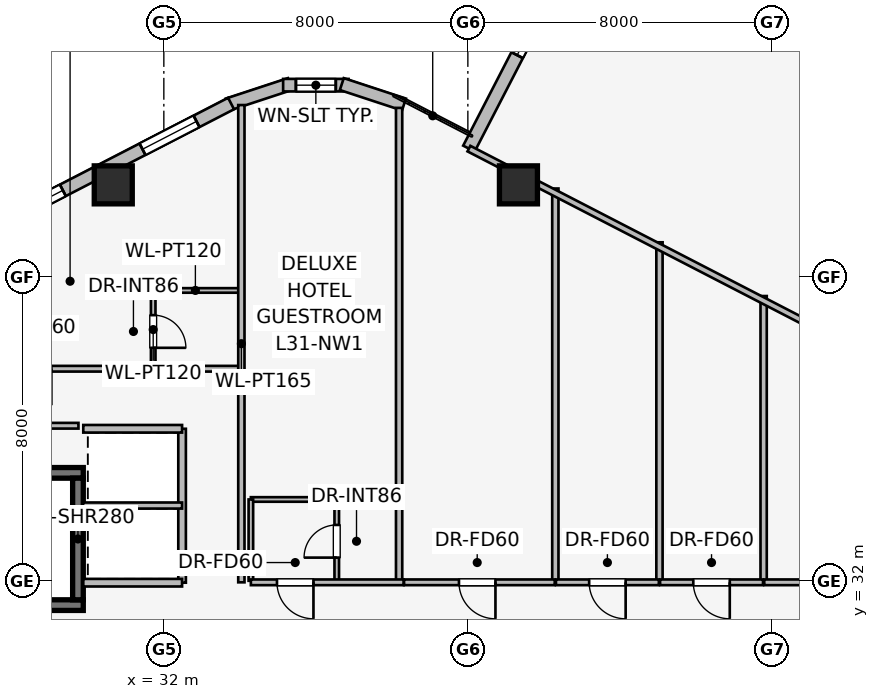
"""IFC4 building model, lengths in metres.
Left out: names, types, materials, properties, quantities, classifications, styles, units other than length and angle.
Written with IfcOpenShell. Run it as: python <this file> out.ifc"""

import sys

from ifc_helpers import new_model, si_unit, direction, frame, frame_2d, origin, origin_2d, place, context, subcontext, project, spatial, rectangle, extrude, element, fill, save


model = new_model("IFC4")
c1 = context("Model", 3, precision=1e-05, world=origin(), true_north=direction((0.0, 1.0)))
c2 = subcontext(c1, "Body", "Model", "MODEL_VIEW")
j1 = project(units=[si_unit("LENGTHUNIT", "METRE"), si_unit("PLANEANGLEUNIT", "RADIAN")], contexts=[c1])
p1 = place(None, origin())
s1 = spatial("IfcSite", under=j1, at=p1, CompositionType="ELEMENT")
p2 = place(p1, origin())
s2 = spatial("IfcBuilding", under=s1, at=p2, CompositionType="ELEMENT")
p3 = place(p2, frame((0.0, 0.0, 118.8)))
s3 = spatial("IfcBuildingStorey", under=s2, at=p3, CompositionType="ELEMENT", Elevation=118.8)
p4 = place(p3, frame((21.52, 31.36, 0.0), z_axis=(0.0, 0.0, 1.0), x_axis=(1.0, 0.0, 0.0)))
e1 = element("IfcWall", 1, at=p4, inside=s3, PredefinedType="SHEAR", context=c2, shape_type="SweptSolid", body=[
    extrude(rectangle(XDim=8.36, YDim=0.28, at=frame_2d((4.18, 0.0))), origin(), (0.0, 0.0, 1.0), 3.45),
])
p5 = place(p4, frame((0.45, 0.0, 0.0)))
e2 = element("IfcOpeningElement", 2, at=p5, cuts=e1, PredefinedType="OPENING", context=c2, shape_type="SweptSolid", body=[
    extrude(rectangle(XDim=1.05, YDim=2.0, at=frame_2d((0.525, 1.0))), frame((0.0, 0.15, 0.0), z_axis=(0.0, -1.0, 0.0), x_axis=(1.0, 0.0, 0.0)), (0.0, 0.0, 1.0), 0.3),
])
p6 = place(p3, frame((29.88, 34.84, 0.0), z_axis=(0.0, 0.0, 1.0), x_axis=(-1.0, 0.0, 0.0)))
e3 = element("IfcWall", 3, at=p6, inside=s3, PredefinedType="SHEAR", context=c2, shape_type="SweptSolid", body=[
    extrude(rectangle(XDim=8.36, YDim=0.28, at=frame_2d((4.18, 0.0))), origin(), (0.0, 0.0, 1.0), 3.45),
])
p7 = place(p3, frame((29.74, 31.5, 0.0), z_axis=(0.0, 0.0, 1.0), x_axis=(0.0, 1.0, 0.0)))
e4 = element("IfcWall", 4, at=p7, inside=s3, PredefinedType="SHEAR", context=c2, shape_type="SweptSolid", body=[
    extrude(rectangle(XDim=3.2, YDim=0.28, at=frame_2d((1.6, 0.0))), origin(), (0.0, 0.0, 1.0), 3.45),
])
for number, where, z_axis, x_axis in (
    (5, (41.331, 42.418, 0.0), (0.0, 0.0, 1.0), (1.0, 0.0, 0.0)),
    (6, (30.669, 42.418, 0.0), (0.0, 0.0, 1.0), (1.0, 0.0, 0.0)),
):
    element("IfcColumn", number, at=place(p3, frame(where, z_axis=z_axis, x_axis=x_axis)), inside=s3, PredefinedType="COLUMN", context=c2, shape_type="SweptSolid", body=[
        extrude(rectangle(XDim=1.0, YDim=1.0, at=origin_2d()), origin(), (0.0, 0.0, 1.0), 3.45),
    ])
p8 = place(p3, frame((40.028, 43.372, 0.0), z_axis=(0.0, 0.0, 1.0), x_axis=(0.45865166523, 0.888616143215, 0.0)))
e7 = element("IfcWall", 7, at=p8, inside=s3, PredefinedType="STANDARD", context=c2, shape_type="SweptSolid", body=[
    extrude(rectangle(XDim=19.199, YDim=0.34, at=frame_2d((9.6, 0.0))), origin(), (0.0, 0.0, 1.0), 3.19),
])
p9 = place(p8, frame((2.767, 0.0, 0.75)))
e8 = element("IfcOpeningElement", 8, at=p9, cuts=e7, PredefinedType="OPENING", context=c2, shape_type="SweptSolid", body=[
    extrude(rectangle(XDim=1.6, YDim=1.55, at=frame_2d((0.8, 0.775))), frame((0.0, 0.18, 0.0), z_axis=(0.0, -1.0, 0.0), x_axis=(1.0, 0.0, 0.0)), (0.0, 0.0, 1.0), 0.36),
])
p10 = place(p8, frame((8.8, 0.0, 0.75)))
e9 = element("IfcOpeningElement", 9, at=p10, cuts=e7, PredefinedType="OPENING", context=c2, shape_type="SweptSolid", body=[
    extrude(rectangle(XDim=1.6, YDim=1.55, at=frame_2d((0.8, 0.775))), frame((0.0, 0.18, 0.0), z_axis=(0.0, -1.0, 0.0), x_axis=(1.0, 0.0, 0.0)), (0.0, 0.0, 1.0), 0.36),
])
p11 = place(p8, frame((14.833, 0.0, 0.75)))
e10 = element("IfcOpeningElement", 10, at=p11, cuts=e7, PredefinedType="OPENING", context=c2, shape_type="SweptSolid", body=[
    extrude(rectangle(XDim=1.6, YDim=1.55, at=frame_2d((0.8, 0.775))), frame((0.0, 0.18, 0.0), z_axis=(0.0, -1.0, 0.0), x_axis=(1.0, 0.0, 0.0)), (0.0, 0.0, 1.0), 0.36),
])
p12 = place(p3, frame((33.681, 44.532, 0.0), z_axis=(0.0, 0.0, 1.0), x_axis=(0.949937416267, 0.312440242569, 0.0)))
e11 = element("IfcWall", 11, at=p12, inside=s3, PredefinedType="STANDARD", context=c2, shape_type="SweptSolid", body=[
    extrude(rectangle(XDim=1.722, YDim=0.33, at=frame_2d((0.861, 0.0))), origin(), (0.0, 0.0, 1.0), 3.19),
])
p13 = place(p3, frame((35.139, 45.041, 0.0), z_axis=(0.0, 0.0, 1.0), x_axis=(1.0, 0.0, 0.0)))
e12 = element("IfcWall", 12, at=p13, inside=s3, PredefinedType="STANDARD", context=c2, shape_type="SweptSolid", body=[
    extrude(rectangle(XDim=1.722, YDim=0.33, at=frame_2d((0.861, 0.0))), origin(), (0.0, 0.0, 1.0), 3.19),
])
p14 = place(p13, frame((0.336, 0.0, 0.75)))
e13 = element("IfcOpeningElement", 13, at=p14, cuts=e12, PredefinedType="OPENING", context=c2, shape_type="SweptSolid", body=[
    extrude(rectangle(XDim=1.05, YDim=1.4, at=frame_2d((0.525, 0.7))), frame((0.0, 0.175, 0.0), z_axis=(0.0, -1.0, 0.0), x_axis=(1.0, 0.0, 0.0)), (0.0, 0.0, 1.0), 0.35),
])
p15 = place(p3, frame((36.683, 45.07, 0.0), z_axis=(0.0, 0.0, 1.0), x_axis=(0.949937416267, -0.312440242569, 0.0)))
e14 = element("IfcWall", 14, at=p15, inside=s3, PredefinedType="STANDARD", context=c2, shape_type="SweptSolid", body=[
    extrude(rectangle(XDim=1.722, YDim=0.33, at=frame_2d((0.861, 0.0))), origin(), (0.0, 0.0, 1.0), 3.19),
])
p16 = place(p3, frame((17.169, 35.99, 0.0), z_axis=(0.0, 0.0, 1.0), x_axis=(0.888613612362, 0.458656568606, 0.0)))
e15 = element("IfcWall", 15, at=p16, inside=s3, PredefinedType="STANDARD", context=c2, shape_type="SweptSolid", body=[
    extrude(rectangle(XDim=18.681, YDim=0.34, at=frame_2d((9.34, 0.0))), origin(), (0.0, 0.0, 1.0), 3.19),
])
p17 = place(p16, frame((1.023, 0.0, 0.75)))
e16 = element("IfcOpeningElement", 16, at=p17, cuts=e15, PredefinedType="OPENING", context=c2, shape_type="SweptSolid", body=[
    extrude(rectangle(XDim=1.6, YDim=1.55, at=frame_2d((0.8, 0.775))), frame((0.0, 0.18, 0.0), z_axis=(0.0, -1.0, 0.0), x_axis=(1.0, 0.0, 0.0)), (0.0, 0.0, 1.0), 0.36),
])
p18 = place(p16, frame((4.981, 0.0, 0.75)))
e17 = element("IfcOpeningElement", 17, at=p18, cuts=e15, PredefinedType="OPENING", context=c2, shape_type="SweptSolid", body=[
    extrude(rectangle(XDim=2.1, YDim=1.5, at=frame_2d((1.05, 0.75))), frame((0.0, 0.18, 0.0), z_axis=(0.0, -1.0, 0.0), x_axis=(1.0, 0.0, 0.0)), (0.0, 0.0, 1.0), 0.36),
])
p19 = place(p16, frame((8.29, 0.0, 0.75)))
e18 = element("IfcOpeningElement", 18, at=p19, cuts=e15, PredefinedType="OPENING", context=c2, shape_type="SweptSolid", body=[
    extrude(rectangle(XDim=2.1, YDim=1.5, at=frame_2d((1.05, 0.75))), frame((0.0, 0.18, 0.0), z_axis=(0.0, -1.0, 0.0), x_axis=(1.0, 0.0, 0.0)), (0.0, 0.0, 1.0), 0.36),
])
p20 = place(p16, frame((11.6, 0.0, 0.75)))
e19 = element("IfcOpeningElement", 19, at=p20, cuts=e15, PredefinedType="OPENING", context=c2, shape_type="SweptSolid", body=[
    extrude(rectangle(XDim=2.1, YDim=1.5, at=frame_2d((1.05, 0.75))), frame((0.0, 0.18, 0.0), z_axis=(0.0, -1.0, 0.0), x_axis=(1.0, 0.0, 0.0)), (0.0, 0.0, 1.0), 0.36),
])
p21 = place(p16, frame((16.058, 0.0, 0.75)))
e20 = element("IfcOpeningElement", 20, at=p21, cuts=e15, PredefinedType="OPENING", context=c2, shape_type="SweptSolid", body=[
    extrude(rectangle(XDim=1.6, YDim=1.55, at=frame_2d((0.8, 0.775))), frame((0.0, 0.18, 0.0), z_axis=(0.0, -1.0, 0.0), x_axis=(1.0, 0.0, 0.0)), (0.0, 0.0, 1.0), 0.36),
])
p22 = place(p3, frame((32.48, 31.95, 0.0), z_axis=(0.0, 0.0, 1.0), x_axis=(0.0, 1.0, 0.0)))
e21 = element("IfcWall", 21, at=p22, inside=s3, PredefinedType="PARTITIONING", context=c2, shape_type="SweptSolid", body=[
    extrude(rectangle(XDim=4.05, YDim=0.2, at=frame_2d((2.025, 0.0))), origin(), (0.0, 0.0, 1.0), 3.19),
])
p23 = place(p3, frame((29.88, 36.0, 0.0), z_axis=(0.0, 0.0, 1.0), x_axis=(1.0, 0.0, 0.0)))
e22 = element("IfcWall", 22, at=p23, inside=s3, PredefinedType="PARTITIONING", context=c2, shape_type="SweptSolid", body=[
    extrude(rectangle(XDim=2.6, YDim=0.2, at=frame_2d((1.3, 0.0))), origin(), (0.0, 0.0, 1.0), 2.582),
])
p24 = place(p3, frame((32.48, 31.95, 0.0), z_axis=(0.0, 0.0, 1.0), x_axis=(-1.0, 0.0, 0.0)))
e23 = element("IfcWall", 23, at=p24, inside=s3, PredefinedType="PARTITIONING", context=c2, shape_type="SweptSolid", body=[
    extrude(rectangle(XDim=2.6, YDim=0.2, at=frame_2d((1.3, 0.0))), origin(), (0.0, 0.0, 1.0), 3.19),
])
p25 = place(p3, frame((29.875, 33.98, 0.0), z_axis=(0.0, 0.0, 1.0), x_axis=(1.0, 0.0, 0.0)))
e24 = element("IfcWall", 24, at=p25, inside=s3, PredefinedType="PARTITIONING", context=c2, shape_type="SweptSolid", body=[
    extrude(rectangle(XDim=2.605, YDim=0.16, at=frame_2d((1.302, 0.0))), origin(), (0.0, 0.0, 1.0), 3.19),
])
p26 = place(p3, frame((34.0, 39.64, 0.0), z_axis=(0.0, 0.0, 1.0), x_axis=(-1.0, 0.0, 0.0)))
e25 = element("IfcWall", 25, at=p26, inside=s3, PredefinedType="PARTITIONING", context=c2, shape_type="SweptSolid", body=[
    extrude(rectangle(XDim=2.34, YDim=0.12, at=frame_2d((1.17, 0.0))), origin(), (0.0, 0.0, 1.0), 2.582),
])
p27 = place(p3, frame((31.72, 39.64, 0.0), z_axis=(0.0, 0.0, 1.0), x_axis=(0.0, -1.0, 0.0)))
e26 = element("IfcWall", 26, at=p27, inside=s3, PredefinedType="PARTITIONING", context=c2, shape_type="SweptSolid", body=[
    extrude(rectangle(XDim=2.06, YDim=0.12, at=frame_2d((1.03, 0.0))), origin(), (0.0, 0.0, 1.0), 3.19),
])
p28 = place(p27, frame((0.65, 0.0, 0.0)))
e27 = element("IfcOpeningElement", 27, at=p28, cuts=e26, PredefinedType="OPENING", context=c2, shape_type="SweptSolid", body=[
    extrude(rectangle(XDim=0.86, YDim=2.0, at=frame_2d((0.43, 1.0))), frame((0.0, 0.07, 0.0), z_axis=(0.0, -1.0, 0.0), x_axis=(1.0, 0.0, 0.0)), (0.0, 0.0, 1.0), 0.14),
])
p29 = place(p3, frame((34.0, 37.58, 0.0), z_axis=(0.0, 0.0, 1.0), x_axis=(-1.0, 0.0, 0.0)))
e28 = element("IfcWall", 28, at=p29, inside=s3, PredefinedType="PARTITIONING", context=c2, shape_type="SweptSolid", body=[
    extrude(rectangle(XDim=13.707, YDim=0.15, at=frame_2d((6.854, 0.0))), origin(), (0.0, 0.0, 1.0), 2.657),
])
p30 = place(p29, frame((4.96, 0.0, 0.0)))
e29 = element("IfcOpeningElement", 29, at=p30, cuts=e28, PredefinedType="OPENING", context=c2, shape_type="SweptSolid", body=[
    extrude(rectangle(XDim=0.96, YDim=2.0, at=frame_2d((0.48, 1.0))), frame((0.0, 0.085, 0.0), z_axis=(0.0, -1.0, 0.0), x_axis=(1.0, 0.0, 0.0)), (0.0, 0.0, 1.0), 0.17),
])
p31 = place(p3, frame((34.04, 31.96, 0.0), z_axis=(0.0, 0.0, 1.0), x_axis=(0.0, 1.0, 0.0)))
e30 = element("IfcWall", 30, at=p31, inside=s3, PredefinedType="PARTITIONING", context=c2, shape_type="SweptSolid", body=[
    extrude(rectangle(XDim=12.558, YDim=0.165, at=frame_2d((6.279, 0.0))), origin(), (0.0, 0.0, 1.0), 3.19),
])
p32 = place(p3, frame((38.191, 31.97, 0.0), z_axis=(0.0, 0.0, 1.0), x_axis=(0.0, 1.0, 0.0)))
e31 = element("IfcWall", 31, at=p32, inside=s3, PredefinedType="PARTITIONING", context=c2, shape_type="SweptSolid", body=[
    extrude(rectangle(XDim=12.473, YDim=0.165, at=frame_2d((6.237, 0.0))), origin(), (0.0, 0.0, 1.0), 3.19),
])
p33 = place(p3, frame((42.302, 31.97, 0.0), z_axis=(0.0, 0.0, 1.0), x_axis=(0.0, 1.0, 0.0)))
e32 = element("IfcWall", 32, at=p33, inside=s3, PredefinedType="PARTITIONING", context=c2, shape_type="SweptSolid", body=[
    extrude(rectangle(XDim=10.352, YDim=0.165, at=frame_2d((5.176, 0.0))), origin(), (0.0, 0.0, 1.0), 3.19),
])
p34 = place(p3, frame((45.042, 31.97, 0.0), z_axis=(0.0, 0.0, 1.0), x_axis=(0.0, 1.0, 0.0)))
e33 = element("IfcWall", 33, at=p34, inside=s3, PredefinedType="PARTITIONING", context=c2, shape_type="SweptSolid", body=[
    extrude(rectangle(XDim=8.937, YDim=0.165, at=frame_2d((4.469, 0.0))), origin(), (0.0, 0.0, 1.0), 3.19),
])
p35 = place(p3, frame((47.783, 31.97, 0.0), z_axis=(0.0, 0.0, 1.0), x_axis=(0.0, 1.0, 0.0)))
e34 = element("IfcWall", 34, at=p35, inside=s3, PredefinedType="PARTITIONING", context=c2, shape_type="SweptSolid", body=[
    extrude(rectangle(XDim=7.523, YDim=0.165, at=frame_2d((3.761, 0.0))), origin(), (0.0, 0.0, 1.0), 3.19),
])
p36 = place(p3, frame((36.55, 31.96, 0.0), z_axis=(0.0, 0.0, 1.0), x_axis=(0.0, 1.0, 0.0)))
e35 = element("IfcWall", 35, at=p36, inside=s3, PredefinedType="PARTITIONING", context=c2, shape_type="SweptSolid", body=[
    extrude(rectangle(XDim=2.24, YDim=0.12, at=frame_2d((1.12, 0.0))), origin(), (0.0, 0.0, 1.0), 3.19),
])
p37 = place(p36, frame((0.65, 0.0, 0.0)))
e36 = element("IfcOpeningElement", 36, at=p37, cuts=e35, PredefinedType="OPENING", context=c2, shape_type="SweptSolid", body=[
    extrude(rectangle(XDim=0.86, YDim=2.0, at=frame_2d((0.43, 1.0))), frame((0.0, 0.07, 0.0), z_axis=(0.0, -1.0, 0.0), x_axis=(1.0, 0.0, 0.0)), (0.0, 0.0, 1.0), 0.14),
])
p38 = place(p3, frame((36.61, 34.14, 0.0), z_axis=(0.0, 0.0, 1.0), x_axis=(-1.0, 0.0, 0.0)))
e37 = element("IfcWall", 37, at=p38, inside=s3, PredefinedType="PARTITIONING", context=c2, shape_type="SweptSolid", body=[
    extrude(rectangle(XDim=2.32, YDim=0.12, at=frame_2d((1.16, 0.0))), origin(), (0.0, 0.0, 1.0), 3.19),
])
p39 = place(p3, frame((34.29, 34.14, 0.0), z_axis=(0.0, 0.0, 1.0), x_axis=(0.0, -1.0, 0.0)))
e38 = element("IfcWall", 38, at=p39, inside=s3, PredefinedType="PARTITIONING", context=c2, shape_type="SweptSolid", body=[
    extrude(rectangle(XDim=2.14, YDim=0.12, at=frame_2d((1.07, 0.0))), origin(), (0.0, 0.0, 1.0), 3.19),
])
p40 = place(p3, frame((38.311, 31.96, 0.0), z_axis=(0.0, 0.0, 1.0), x_axis=(-1.0, 0.0, 0.0)))
e39 = element("IfcWall", 39, at=p40, inside=s3, PredefinedType="PARTITIONING", context=c2, shape_type="SweptSolid", body=[
    extrude(rectangle(XDim=4.021, YDim=0.15, at=frame_2d((2.01, 0.0))), origin(), (0.0, 0.0, 1.0), 3.19),
])
p41 = place(p40, frame((2.374, 0.0, 0.0)))
e40 = element("IfcOpeningElement", 40, at=p41, cuts=e39, PredefinedType="OPENING", context=c2, shape_type="SweptSolid", body=[
    extrude(rectangle(XDim=0.96, YDim=2.0, at=frame_2d((0.48, 1.0))), frame((0.0, 0.085, 0.0), z_axis=(0.0, -1.0, 0.0), x_axis=(1.0, 0.0, 0.0)), (0.0, 0.0, 1.0), 0.17),
])
p42 = place(p3, frame((42.286, 31.96, 0.0), z_axis=(0.0, 0.0, 1.0), x_axis=(-1.0, 0.0, 0.0)))
e41 = element("IfcWall", 41, at=p42, inside=s3, PredefinedType="PARTITIONING", context=c2, shape_type="SweptSolid", body=[
    extrude(rectangle(XDim=3.965, YDim=0.15, at=frame_2d((1.982, 0.0))), origin(), (0.0, 0.0, 1.0), 3.19),
])
p43 = place(p42, frame((1.56, 0.0, 0.0)))
e42 = element("IfcOpeningElement", 42, at=p43, cuts=e41, PredefinedType="OPENING", context=c2, shape_type="SweptSolid", body=[
    extrude(rectangle(XDim=0.96, YDim=2.0, at=frame_2d((0.48, 1.0))), frame((0.0, 0.085, 0.0), z_axis=(0.0, -1.0, 0.0), x_axis=(1.0, 0.0, 0.0)), (0.0, 0.0, 1.0), 0.17),
])
p44 = place(p3, frame((45.026, 31.96, 0.0), z_axis=(0.0, 0.0, 1.0), x_axis=(-1.0, 0.0, 0.0)))
e43 = element("IfcWall", 43, at=p44, inside=s3, PredefinedType="PARTITIONING", context=c2, shape_type="SweptSolid", body=[
    extrude(rectangle(XDim=2.708, YDim=0.15, at=frame_2d((1.354, 0.0))), origin(), (0.0, 0.0, 1.0), 3.19),
])
p45 = place(p44, frame((0.874, 0.0, 0.0)))
e44 = element("IfcOpeningElement", 44, at=p45, cuts=e43, PredefinedType="OPENING", context=c2, shape_type="SweptSolid", body=[
    extrude(rectangle(XDim=0.96, YDim=2.0, at=frame_2d((0.48, 1.0))), frame((0.0, 0.085, 0.0), z_axis=(0.0, -1.0, 0.0), x_axis=(1.0, 0.0, 0.0)), (0.0, 0.0, 1.0), 0.17),
])
p46 = place(p3, frame((47.767, 31.96, 0.0), z_axis=(0.0, 0.0, 1.0), x_axis=(-1.0, 0.0, 0.0)))
e45 = element("IfcWall", 45, at=p46, inside=s3, PredefinedType="PARTITIONING", context=c2, shape_type="SweptSolid", body=[
    extrude(rectangle(XDim=2.709, YDim=0.15, at=frame_2d((1.354, 0.0))), origin(), (0.0, 0.0, 1.0), 3.19),
])
p47 = place(p46, frame((0.875, 0.0, 0.0)))
e46 = element("IfcOpeningElement", 46, at=p47, cuts=e45, PredefinedType="OPENING", context=c2, shape_type="SweptSolid", body=[
    extrude(rectangle(XDim=0.96, YDim=2.0, at=frame_2d((0.48, 1.0))), frame((0.0, 0.085, 0.0), z_axis=(0.0, -1.0, 0.0), x_axis=(1.0, 0.0, 0.0)), (0.0, 0.0, 1.0), 0.17),
])
p48 = place(p3, frame((52.22, 31.96, 0.0), z_axis=(0.0, 0.0, 1.0), x_axis=(-1.0, 0.0, 0.0)))
e47 = element("IfcWall", 47, at=p48, inside=s3, PredefinedType="PARTITIONING", context=c2, shape_type="SweptSolid", body=[
    extrude(rectangle(XDim=4.421, YDim=0.15, at=frame_2d((2.21, 0.0))), origin(), (0.0, 0.0, 1.0), 3.19),
])
p49 = place(p48, frame((1.674, 0.0, 0.0)))
e48 = element("IfcOpeningElement", 48, at=p49, cuts=e47, PredefinedType="OPENING", context=c2, shape_type="SweptSolid", body=[
    extrude(rectangle(XDim=0.96, YDim=2.0, at=frame_2d((0.48, 1.0))), frame((0.0, 0.085, 0.0), z_axis=(0.0, -1.0, 0.0), x_axis=(1.0, 0.0, 0.0)), (0.0, 0.0, 1.0), 0.17),
])
p50 = place(p3, frame((52.823, 36.767, 0.0), z_axis=(0.0, 0.0, 1.0), x_axis=(-0.888588109751, 0.458705974683, 0.0)))
e49 = element("IfcWall", 49, at=p50, inside=s3, PredefinedType="PARTITIONING", context=c2, shape_type="SweptSolid", body=[
    extrude(rectangle(XDim=14.399, YDim=0.165, at=frame_2d((7.2, 0.0))), origin(), (0.0, 0.0, 1.0), 2.562),
])
p51 = place(p50, frame((2.6, 0.0, 0.0)))
e50 = element("IfcOpeningElement", 50, at=p51, cuts=e49, PredefinedType="OPENING", context=c2, shape_type="SweptSolid", body=[
    extrude(rectangle(XDim=0.96, YDim=2.0, at=frame_2d((0.48, 1.0))), frame((0.0, 0.093, 0.0), z_axis=(0.0, -1.0, 0.0), x_axis=(1.0, 0.0, 0.0)), (0.0, 0.0, 1.0), 0.185),
])
p52 = place(p3, frame((29.753, 36.08, 0.0), z_axis=(0.0, 0.0, 1.0), x_axis=(-1.0, 0.0, 0.0)))
e51 = element("IfcWall", 51, at=p52, inside=s3, PredefinedType="PARTITIONING", context=c2, shape_type="SweptSolid", body=[
    extrude(rectangle(XDim=7.353, YDim=0.15, at=frame_2d((3.677, 0.0))), origin(), (0.0, 0.0, 1.0), 2.657),
])
p53 = place(p9, origin())
e52 = element("IfcWindow", 52, at=p53, inside=s3, PartitioningType="SINGLE_PANEL", PredefinedType="WINDOW", context=c2, shape_type="SweptSolid", body=[
    extrude(rectangle(XDim=1.6, YDim=1.55, at=frame_2d((0.8, 0.775))), frame((0.0, 0.03, 0.0), z_axis=(0.0, -1.0, 0.0), x_axis=(1.0, 0.0, 0.0)), (0.0, 0.0, 1.0), 0.06),
])
fill(e8, e52)
p54 = place(p14, origin())
e53 = element("IfcWindow", 53, at=p54, inside=s3, PartitioningType="SINGLE_PANEL", PredefinedType="WINDOW", context=c2, shape_type="SweptSolid", body=[
    extrude(rectangle(XDim=1.05, YDim=1.4, at=frame_2d((0.525, 0.7))), frame((0.0, 0.03, 0.0), z_axis=(0.0, -1.0, 0.0), x_axis=(1.0, 0.0, 0.0)), (0.0, 0.0, 1.0), 0.06),
])
fill(e13, e53)
p55 = place(p20, origin())
e54 = element("IfcWindow", 54, at=p55, inside=s3, PartitioningType="SINGLE_PANEL", PredefinedType="WINDOW", context=c2, shape_type="SweptSolid", body=[
    extrude(rectangle(XDim=2.1, YDim=1.5, at=frame_2d((1.05, 0.75))), frame((0.0, 0.03, 0.0), z_axis=(0.0, -1.0, 0.0), x_axis=(1.0, 0.0, 0.0)), (0.0, 0.0, 1.0), 0.06),
])
fill(e19, e54)
p56 = place(p21, origin())
e55 = element("IfcWindow", 55, at=p56, inside=s3, PartitioningType="SINGLE_PANEL", PredefinedType="WINDOW", context=c2, shape_type="SweptSolid", body=[
    extrude(rectangle(XDim=1.6, YDim=1.55, at=frame_2d((0.8, 0.775))), frame((0.0, 0.03, 0.0), z_axis=(0.0, -1.0, 0.0), x_axis=(1.0, 0.0, 0.0)), (0.0, 0.0, 1.0), 0.06),
])
fill(e20, e55)
p57 = place(p28, origin())
e56 = element("IfcDoor", 56, at=p57, inside=s3, OperationType="SINGLE_SWING_RIGHT", PredefinedType="DOOR", context=c2, shape_type="SweptSolid", body=[
    extrude(rectangle(XDim=0.86, YDim=2.0, at=frame_2d((0.43, 1.0))), frame((0.0, 0.025, 0.0), z_axis=(0.0, -1.0, 0.0), x_axis=(1.0, 0.0, 0.0)), (0.0, 0.0, 1.0), 0.05),
])
fill(e27, e56)
p58 = place(p37, origin())
e57 = element("IfcDoor", 57, at=p58, inside=s3, OperationType="SINGLE_SWING_LEFT", PredefinedType="DOOR", context=c2, shape_type="SweptSolid", body=[
    extrude(rectangle(XDim=0.86, YDim=2.0, at=frame_2d((0.43, 1.0))), frame((0.0, 0.025, 0.0), z_axis=(0.0, -1.0, 0.0), x_axis=(1.0, 0.0, 0.0)), (0.0, 0.0, 1.0), 0.05),
])
fill(e36, e57)
p59 = place(p41, origin())
e58 = element("IfcDoor", 58, at=p59, inside=s3, OperationType="SINGLE_SWING_LEFT", PredefinedType="DOOR", context=c2, shape_type="SweptSolid", body=[
    extrude(rectangle(XDim=0.96, YDim=2.0, at=frame_2d((0.48, 1.0))), frame((0.0, 0.025, 0.0), z_axis=(0.0, -1.0, 0.0), x_axis=(1.0, 0.0, 0.0)), (0.0, 0.0, 1.0), 0.05),
])
fill(e40, e58)
p60 = place(p43, origin())
e59 = element("IfcDoor", 59, at=p60, inside=s3, OperationType="SINGLE_SWING_LEFT", PredefinedType="DOOR", context=c2, shape_type="SweptSolid", body=[
    extrude(rectangle(XDim=0.96, YDim=2.0, at=frame_2d((0.48, 1.0))), frame((0.0, 0.025, 0.0), z_axis=(0.0, -1.0, 0.0), x_axis=(1.0, 0.0, 0.0)), (0.0, 0.0, 1.0), 0.05),
])
fill(e42, e59)
p61 = place(p45, origin())
e60 = element("IfcDoor", 60, at=p61, inside=s3, OperationType="SINGLE_SWING_LEFT", PredefinedType="DOOR", context=c2, shape_type="SweptSolid", body=[
    extrude(rectangle(XDim=0.96, YDim=2.0, at=frame_2d((0.48, 1.0))), frame((0.0, 0.025, 0.0), z_axis=(0.0, -1.0, 0.0), x_axis=(1.0, 0.0, 0.0)), (0.0, 0.0, 1.0), 0.05),
])
fill(e44, e60)
p62 = place(p47, origin())
e61 = element("IfcDoor", 61, at=p62, inside=s3, OperationType="SINGLE_SWING_LEFT", PredefinedType="DOOR", context=c2, shape_type="SweptSolid", body=[
    extrude(rectangle(XDim=0.96, YDim=2.0, at=frame_2d((0.48, 1.0))), frame((0.0, 0.025, 0.0), z_axis=(0.0, -1.0, 0.0), x_axis=(1.0, 0.0, 0.0)), (0.0, 0.0, 1.0), 0.05),
])
fill(e46, e61)
save(model, sys.argv[1])
